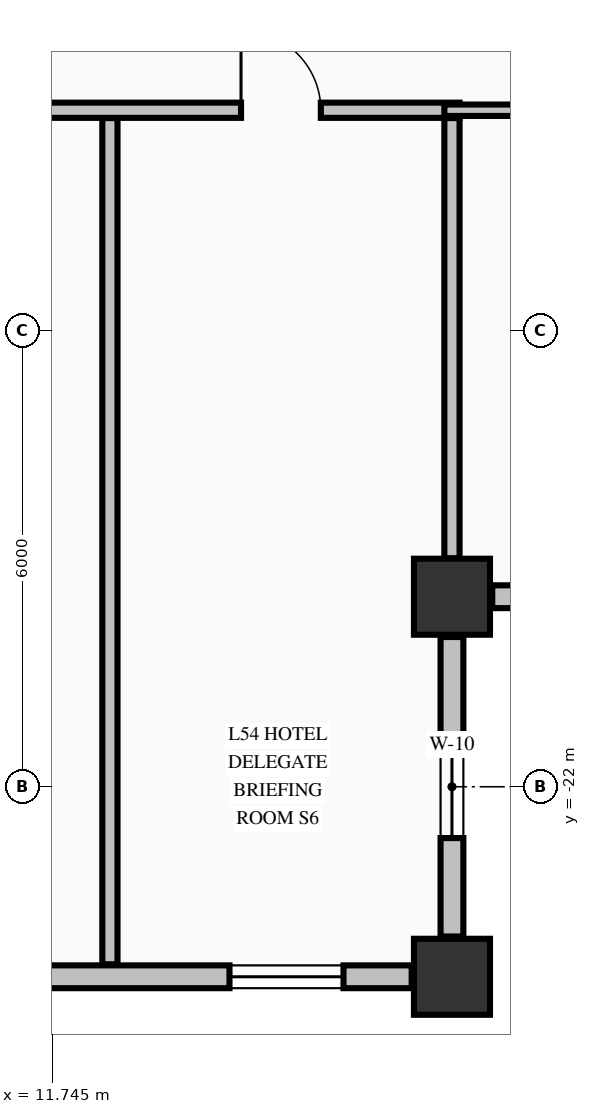
"""IFC4 building model, lengths in metres.
Left out: names, types, materials, properties, quantities, classifications, styles, units other than length and angle.
Written with IfcOpenShell. Run it as: python <this file> out.ifc"""

import sys

from ifc_helpers import new_model, si_unit, direction, frame, frame_2d, origin, origin_2d, place, context, subcontext, project, spatial, rectangle, extrude, element, fill, save


model = new_model("IFC4")
c1 = context("Model", 3, precision=1e-05, world=origin(), true_north=direction((0.0, 1.0)))
c2 = subcontext(c1, "Body", "Model", "MODEL_VIEW")
j1 = project(units=[si_unit("LENGTHUNIT", "METRE"), si_unit("PLANEANGLEUNIT", "RADIAN")], contexts=[c1])
p1 = place(None, origin())
s1 = spatial("IfcSite", under=j1, at=p1, CompositionType="ELEMENT")
p2 = place(p1, origin())
s2 = spatial("IfcBuilding", under=s1, at=p2, CompositionType="ELEMENT")
p3 = place(p2, frame((0.0, 0.0, 208.46)))
s3 = spatial("IfcBuildingStorey", under=s2, at=p3, CompositionType="ELEMENT", Elevation=208.46)
for number, where, z_axis, x_axis in (
    (1, (17.0, -24.5, -0.25), (0.0, 0.0, 1.0), (1.0, 0.0, 0.0)),
    (2, (17.0, -19.5, -0.25), (0.0, 0.0, 1.0), (1.0, 0.0, 0.0)),
):
    element("IfcColumn", number, at=place(p3, frame(where, z_axis=z_axis, x_axis=x_axis)), inside=s3, PredefinedType="COLUMN", context=c2, shape_type="SweptSolid", body=[
        extrude(rectangle(XDim=1.0, YDim=1.0, at=origin_2d()), origin(), (0.0, 0.0, 1.0), 3.325),
    ])
p4 = place(p3, frame((17.0, -23.97, 0.0), z_axis=(0.0, 0.0, 1.0), x_axis=(0.0, 1.0, 0.0)))
e3 = element("IfcWall", 3, at=p4, inside=s3, PredefinedType="STANDARD", context=c2, shape_type="SweptSolid", body=[
    extrude(rectangle(XDim=3.94, YDim=0.3, at=frame_2d((1.97, 0.0))), origin(), (0.0, 0.0, 1.0), 2.467),
])
p5 = place(p4, frame((1.295, 0.0, 0.68)))
e4 = element("IfcOpeningElement", 4, at=p5, cuts=e3, PredefinedType="OPENING", context=c2, shape_type="SweptSolid", body=[
    extrude(rectangle(XDim=1.35, YDim=1.42, at=frame_2d((0.675, 0.71))), frame((0.0, 0.16, 0.0), z_axis=(0.0, -1.0, 0.0), x_axis=(1.0, 0.0, 0.0)), (0.0, 0.0, 1.0), 0.32),
])
p6 = place(p3, frame((17.53, -19.5, 0.0), z_axis=(0.0, 0.0, 1.0), x_axis=(1.0, 0.0, 0.0)))
e5 = element("IfcWall", 5, at=p6, inside=s3, PredefinedType="STANDARD", context=c2, shape_type="SweptSolid", body=[
    extrude(rectangle(XDim=3.94, YDim=0.3, at=frame_2d((1.97, 0.0))), origin(), (0.0, 0.0, 1.0), 2.467),
])
p7 = place(p6, frame((1.295, 0.0, 0.68)))
e6 = element("IfcOpeningElement", 6, at=p7, cuts=e5, PredefinedType="OPENING", context=c2, shape_type="SweptSolid", body=[
    extrude(rectangle(XDim=1.35, YDim=1.42, at=frame_2d((0.675, 0.71))), frame((0.0, 0.16, 0.0), z_axis=(0.0, -1.0, 0.0), x_axis=(1.0, 0.0, 0.0)), (0.0, 0.0, 1.0), 0.32),
])
p8 = place(p3, frame((11.53, -24.5, 0.0), z_axis=(0.0, 0.0, 1.0), x_axis=(1.0, 0.0, 0.0)))
e7 = element("IfcWall", 7, at=p8, inside=s3, PredefinedType="STANDARD", context=c2, shape_type="SweptSolid", body=[
    extrude(rectangle(XDim=4.94, YDim=0.3, at=frame_2d((2.47, 0.0))), origin(), (0.0, 0.0, 1.0), 2.467),
])
p9 = place(p8, frame((2.543, 0.0, 0.72)))
e8 = element("IfcOpeningElement", 8, at=p9, cuts=e7, PredefinedType="OPENING", context=c2, shape_type="SweptSolid", body=[
    extrude(rectangle(XDim=1.5, YDim=1.6, at=frame_2d((0.75, 0.8))), frame((0.0, 0.16, 0.0), z_axis=(0.0, -1.0, 0.0), x_axis=(1.0, 0.0, 0.0)), (0.0, 0.0, 1.0), 0.32),
])
p10 = place(p3, frame((-22.1, -13.1, 0.0), z_axis=(0.0, 0.0, 1.0), x_axis=(1.0, 0.0, 0.0)))
e9 = element("IfcWall", 9, at=p10, inside=s3, PredefinedType="PARTITIONING", context=c2, shape_type="SweptSolid", body=[
    extrude(rectangle(XDim=39.2, YDim=0.2, at=frame_2d((19.6, 0.0))), origin(), (0.0, 0.0, 1.0), 3.075),
])
p11 = place(p10, frame((4.025, 0.0, 0.0)))
e10 = element("IfcOpeningElement", 10, at=p11, cuts=e9, PredefinedType="OPENING", context=c2, shape_type="SweptSolid", body=[
    extrude(rectangle(XDim=0.95, YDim=2.15, at=frame_2d((0.475, 1.075))), frame((0.0, 0.11, 0.0), z_axis=(0.0, -1.0, 0.0), x_axis=(1.0, 0.0, 0.0)), (0.0, 0.0, 1.0), 0.22),
])
p12 = place(p10, frame((10.075, 0.0, 0.0)))
e11 = element("IfcOpeningElement", 11, at=p12, cuts=e9, PredefinedType="OPENING", context=c2, shape_type="SweptSolid", body=[
    extrude(rectangle(XDim=0.95, YDim=2.15, at=frame_2d((0.475, 1.075))), frame((0.0, 0.11, 0.0), z_axis=(0.0, -1.0, 0.0), x_axis=(1.0, 0.0, 0.0)), (0.0, 0.0, 1.0), 0.22),
])
p13 = place(p10, frame((16.905, 0.0, 0.0)))
e12 = element("IfcOpeningElement", 12, at=p13, cuts=e9, PredefinedType="OPENING", context=c2, shape_type="SweptSolid", body=[
    extrude(rectangle(XDim=0.95, YDim=2.15, at=frame_2d((0.475, 1.075))), frame((0.0, 0.11, 0.0), z_axis=(0.0, -1.0, 0.0), x_axis=(1.0, 0.0, 0.0)), (0.0, 0.0, 1.0), 0.22),
])
p14 = place(p10, frame((22.475, 0.0, 0.0)))
e13 = element("IfcOpeningElement", 13, at=p14, cuts=e9, PredefinedType="OPENING", context=c2, shape_type="SweptSolid", body=[
    extrude(rectangle(XDim=0.95, YDim=2.15, at=frame_2d((0.475, 1.075))), frame((0.0, 0.11, 0.0), z_axis=(0.0, -1.0, 0.0), x_axis=(1.0, 0.0, 0.0)), (0.0, 0.0, 1.0), 0.22),
])
p15 = place(p10, frame((30.675, 0.0, 0.0)))
e14 = element("IfcOpeningElement", 14, at=p15, cuts=e9, PredefinedType="OPENING", context=c2, shape_type="SweptSolid", body=[
    extrude(rectangle(XDim=0.95, YDim=2.15, at=frame_2d((0.475, 1.075))), frame((0.0, 0.11, 0.0), z_axis=(0.0, -1.0, 0.0), x_axis=(1.0, 0.0, 0.0)), (0.0, 0.0, 1.0), 0.22),
])
p16 = place(p10, frame((36.325, 0.0, 0.0)))
e15 = element("IfcOpeningElement", 15, at=p16, cuts=e9, PredefinedType="OPENING", context=c2, shape_type="SweptSolid", body=[
    extrude(rectangle(XDim=1.05, YDim=2.15, at=frame_2d((0.525, 1.075))), frame((0.0, 0.11, 0.0), z_axis=(0.0, -1.0, 0.0), x_axis=(1.0, 0.0, 0.0)), (0.0, 0.0, 1.0), 0.22),
])
p17 = place(p3, frame((16.9, -13.1, 0.0), z_axis=(0.0, 0.0, 1.0), x_axis=(1.0, 0.0, 0.0)))
e16 = element("IfcWall", 16, at=p17, inside=s3, PredefinedType="PARTITIONING", context=c2, shape_type="SweptSolid", body=[
    extrude(rectangle(XDim=3.175, YDim=0.15, at=frame_2d((1.587, 0.0))), origin(), (0.0, 0.0, 1.0), 3.075),
])
p18 = place(p3, frame((12.5, -24.335, 0.0), z_axis=(0.0, 0.0, 1.0), x_axis=(0.0, 1.0, 0.0)))
e17 = element("IfcWall", 17, at=p18, inside=s3, PredefinedType="PARTITIONING", context=c2, shape_type="SweptSolid", body=[
    extrude(rectangle(XDim=11.132, YDim=0.2, at=frame_2d((5.566, 0.0))), origin(), (0.0, 0.0, 1.0), 3.075),
])
p19 = place(p3, frame((17.0, -18.994, 0.0), z_axis=(0.0, 0.0, 1.0), x_axis=(0.0, 1.0, 0.0)))
e18 = element("IfcWall", 18, at=p19, inside=s3, PredefinedType="PARTITIONING", context=c2, shape_type="SweptSolid", body=[
    extrude(rectangle(XDim=5.791, YDim=0.2, at=frame_2d((2.896, 0.0))), origin(), (0.0, 0.0, 1.0), 3.075),
])
p20 = place(p5, origin())
e19 = element("IfcWindow", 19, at=p20, inside=s3, PartitioningType="SINGLE_PANEL", PredefinedType="WINDOW", context=c2, shape_type="SweptSolid", body=[
    extrude(rectangle(XDim=1.35, YDim=1.42, at=frame_2d((0.675, 0.71))), frame((0.0, 0.03, 0.0), z_axis=(0.0, -1.0, 0.0), x_axis=(1.0, 0.0, 0.0)), (0.0, 0.0, 1.0), 0.06),
])
fill(e4, e19)
p21 = place(p9, origin())
e20 = element("IfcWindow", 20, at=p21, inside=s3, PartitioningType="SINGLE_PANEL", PredefinedType="WINDOW", context=c2, shape_type="SweptSolid", body=[
    extrude(rectangle(XDim=1.5, YDim=1.6, at=frame_2d((0.75, 0.8))), frame((0.0, 0.03, 0.0), z_axis=(0.0, -1.0, 0.0), x_axis=(1.0, 0.0, 0.0)), (0.0, 0.0, 1.0), 0.06),
])
fill(e8, e20)
p22 = place(p16, origin())
e21 = element("IfcDoor", 21, at=p22, inside=s3, OperationType="SINGLE_SWING_LEFT", PredefinedType="DOOR", context=c2, shape_type="SweptSolid", body=[
    extrude(rectangle(XDim=1.05, YDim=2.15, at=frame_2d((0.525, 1.075))), frame((0.0, 0.025, 0.0), z_axis=(0.0, -1.0, 0.0), x_axis=(1.0, 0.0, 0.0)), (0.0, 0.0, 1.0), 0.05),
])
fill(e15, e21)
save(model, sys.argv[1])
